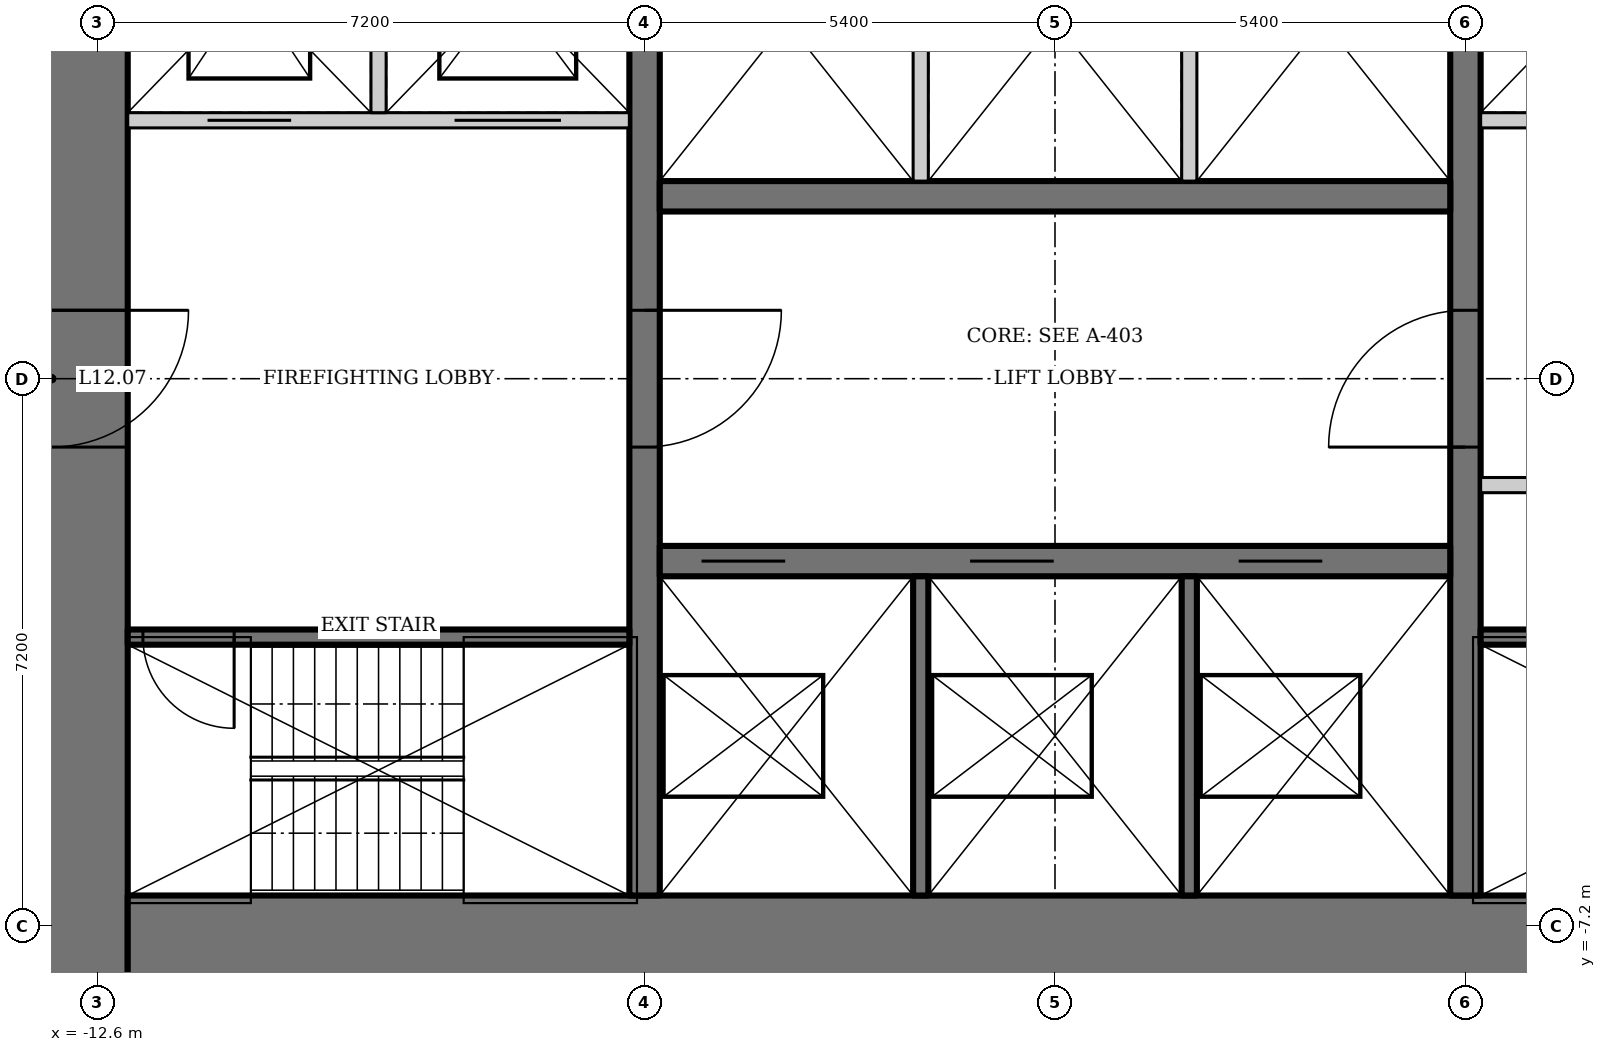
"""IFC4 building model, lengths in metres.
Left out: names, types, materials, properties, quantities, classifications, styles, units other than length and angle.
Written with IfcOpenShell. Run it as: python <this file> out.ifc"""

import sys

from ifc_helpers import new_model, si_unit, direction, frame, frame_2d, origin, place, context, subcontext, project, spatial, rectangle, extrude, element, fill, save


model = new_model("IFC4")
c1 = context("Model", 3, precision=1e-05, world=origin(), true_north=direction((0.0, 1.0)))
c2 = subcontext(c1, "Body", "Model", "MODEL_VIEW")
j1 = project(units=[si_unit("LENGTHUNIT", "METRE"), si_unit("PLANEANGLEUNIT", "RADIAN")], contexts=[c1])
p1 = place(None, origin())
s1 = spatial("IfcSite", under=j1, at=p1, CompositionType="ELEMENT")
p2 = place(p1, origin())
s2 = spatial("IfcBuilding", under=s1, at=p2, CompositionType="ELEMENT")
p3 = place(p2, frame((0.0, 0.0, 58.6)))
s3 = spatial("IfcBuildingStorey", under=s2, at=p3, CompositionType="ELEMENT", Elevation=58.6)
p4 = place(p3, frame((-13.2, 13.0, 0.0), z_axis=(0.0, 0.0, 1.0), x_axis=(0.0, -1.0, 0.0)))
e1 = element("IfcWall", 1, at=p4, inside=s3, PredefinedType="SHEAR", context=c2, shape_type="SweptSolid", body=[
    extrude(rectangle(XDim=26.0, YDim=2.0, at=frame_2d((13.0, 0.0))), origin(), (0.0, 0.0, 1.0), 3.6),
])
p5 = place(p4, frame((12.1, 0.0, 0.0)))
e2 = element("IfcOpeningElement", 2, at=p5, cuts=e1, PredefinedType="OPENING", context=c2, shape_type="SweptSolid", body=[
    extrude(rectangle(XDim=1.8, YDim=2.1, at=frame_2d((0.9, 1.05))), frame((0.0, 1.01, 0.0), z_axis=(0.0, -1.0, 0.0), x_axis=(1.0, 0.0, 0.0)), (0.0, 0.0, 1.0), 2.02),
])
p6 = place(p3, frame((-12.2, -8.0, 0.0), z_axis=(0.0, 0.0, 1.0), x_axis=(1.0, 0.0, 0.0)))
e3 = element("IfcWall", 3, at=p6, inside=s3, PredefinedType="SHEAR", context=c2, shape_type="SweptSolid", body=[
    extrude(rectangle(XDim=24.4, YDim=2.4, at=frame_2d((12.2, 0.0))), origin(), (0.0, 0.0, 1.0), 3.6),
])
p7 = place(p3, frame((5.4, -6.8, 0.0), z_axis=(0.0, 0.0, 1.0), x_axis=(0.0, 1.0, 0.0)))
e4 = element("IfcWall", 4, at=p7, inside=s3, PredefinedType="SHEAR", context=c2, shape_type="SweptSolid", body=[
    extrude(rectangle(XDim=13.6, YDim=0.4, at=frame_2d((6.8, 0.0))), origin(), (0.0, 0.0, 1.0), 3.6),
])
p8 = place(p7, frame((5.9, 0.0, 0.0)))
e5 = element("IfcOpeningElement", 5, at=p8, cuts=e4, PredefinedType="OPENING", context=c2, shape_type="SweptSolid", body=[
    extrude(rectangle(XDim=1.8, YDim=2.1, at=frame_2d((0.9, 1.05))), frame((0.0, 0.21, 0.0), z_axis=(0.0, -1.0, 0.0), x_axis=(1.0, 0.0, 0.0)), (0.0, 0.0, 1.0), 0.42),
])
p9 = place(p3, frame((-5.4, 6.8, 0.0), z_axis=(0.0, 0.0, 1.0), x_axis=(0.0, -1.0, 0.0)))
e6 = element("IfcWall", 6, at=p9, inside=s3, PredefinedType="SHEAR", context=c2, shape_type="SweptSolid", body=[
    extrude(rectangle(XDim=13.6, YDim=0.4, at=frame_2d((6.8, 0.0))), origin(), (0.0, 0.0, 1.0), 3.6),
])
p10 = place(p9, frame((5.9, 0.0, 0.0)))
e7 = element("IfcOpeningElement", 7, at=p10, cuts=e6, PredefinedType="OPENING", context=c2, shape_type="SweptSolid", body=[
    extrude(rectangle(XDim=1.8, YDim=2.1, at=frame_2d((0.9, 1.05))), frame((0.0, 0.21, 0.0), z_axis=(0.0, -1.0, 0.0), x_axis=(1.0, 0.0, 0.0)), (0.0, 0.0, 1.0), 0.42),
])
p11 = place(p3, frame((-5.2, -2.4, 0.0), z_axis=(0.0, 0.0, 1.0), x_axis=(1.0, 0.0, 0.0)))
e8 = element("IfcWall", 8, at=p11, inside=s3, PredefinedType="SHEAR", context=c2, shape_type="SweptSolid", body=[
    extrude(rectangle(XDim=10.4, YDim=0.4, at=frame_2d((5.2, 0.0))), origin(), (0.0, 0.0, 1.0), 3.6),
])
p12 = place(p11, frame((0.55, 0.0, 0.0)))
e9 = element("IfcOpeningElement", 9, at=p12, cuts=e8, PredefinedType="OPENING", context=c2, shape_type="SweptSolid", body=[
    extrude(rectangle(XDim=1.1, YDim=2.2, at=frame_2d((0.55, 1.1))), frame((0.0, 0.21, 0.0), z_axis=(0.0, -1.0, 0.0), x_axis=(1.0, 0.0, 0.0)), (0.0, 0.0, 1.0), 0.42),
])
p13 = place(p11, frame((4.083, 0.0, 0.0)))
e10 = element("IfcOpeningElement", 10, at=p13, cuts=e8, PredefinedType="OPENING", context=c2, shape_type="SweptSolid", body=[
    extrude(rectangle(XDim=1.1, YDim=2.2, at=frame_2d((0.55, 1.1))), frame((0.0, 0.21, 0.0), z_axis=(0.0, -1.0, 0.0), x_axis=(1.0, 0.0, 0.0)), (0.0, 0.0, 1.0), 0.42),
])
p14 = place(p11, frame((7.617, 0.0, 0.0)))
e11 = element("IfcOpeningElement", 11, at=p14, cuts=e8, PredefinedType="OPENING", context=c2, shape_type="SweptSolid", body=[
    extrude(rectangle(XDim=1.1, YDim=2.2, at=frame_2d((0.55, 1.1))), frame((0.0, 0.21, 0.0), z_axis=(0.0, -1.0, 0.0), x_axis=(1.0, 0.0, 0.0)), (0.0, 0.0, 1.0), 0.42),
])
for number, where, z_axis, x_axis in (
    (12, (-1.767, -2.6, 0.0), (0.0, 0.0, 1.0), (0.0, -1.0, 0.0)),
    (13, (1.767, -2.6, 0.0), (0.0, 0.0, 1.0), (0.0, -1.0, 0.0)),
):
    element("IfcWall", number, at=place(p3, frame(where, z_axis=z_axis, x_axis=x_axis)), inside=s3, PredefinedType="SOLIDWALL", context=c2, shape_type="SweptSolid", body=[
        extrude(rectangle(XDim=4.2, YDim=0.2, at=frame_2d((2.1, 0.0))), origin(), (0.0, 0.0, 1.0), 3.6),
    ])
p15 = place(p3, frame((5.2, 2.4, 0.0), z_axis=(0.0, 0.0, 1.0), x_axis=(-1.0, 0.0, 0.0)))
e14 = element("IfcWall", 14, at=p15, inside=s3, PredefinedType="SHEAR", context=c2, shape_type="SweptSolid", body=[
    extrude(rectangle(XDim=10.4, YDim=0.4, at=frame_2d((5.2, 0.0))), origin(), (0.0, 0.0, 1.0), 3.6),
])
for number, where, z_axis, x_axis in (
    (15, (-1.767, 2.6, 0.0), (0.0, 0.0, 1.0), (0.0, 1.0, 0.0)),
    (16, (1.767, 2.6, 0.0), (0.0, 0.0, 1.0), (0.0, 1.0, 0.0)),
):
    element("IfcWall", number, at=place(p3, frame(where, z_axis=z_axis, x_axis=x_axis)), inside=s3, PredefinedType="SOLIDWALL", context=c2, shape_type="SweptSolid", body=[
        extrude(rectangle(XDim=4.2, YDim=0.2, at=frame_2d((2.1, 0.0))), origin(), (0.0, 0.0, 1.0), 3.6),
    ])
p16 = place(p3, frame((5.6, -3.4, 0.0), z_axis=(0.0, 0.0, 1.0), x_axis=(1.0, 0.0, 0.0)))
e17 = element("IfcWall", 17, at=p16, inside=s3, PredefinedType="SHEAR", context=c2, shape_type="SweptSolid", body=[
    extrude(rectangle(XDim=6.6, YDim=0.2, at=frame_2d((3.3, 0.0))), origin(), (0.0, 0.0, 1.0), 3.6),
])
p17 = place(p16, frame((5.2, 0.0, 0.0)))
e18 = element("IfcOpeningElement", 18, at=p17, cuts=e17, PredefinedType="OPENING", context=c2, shape_type="SweptSolid", body=[
    extrude(rectangle(XDim=1.2, YDim=2.1, at=frame_2d((0.6, 1.05))), frame((0.0, 0.11, 0.0), z_axis=(0.0, -1.0, 0.0), x_axis=(1.0, 0.0, 0.0)), (0.0, 0.0, 1.0), 0.22),
])
p18 = place(p3, frame((12.2, 3.4, 0.0), z_axis=(0.0, 0.0, 1.0), x_axis=(-1.0, 0.0, 0.0)))
e19 = element("IfcWall", 19, at=p18, inside=s3, PredefinedType="SOLIDWALL", context=c2, shape_type="SweptSolid", body=[
    extrude(rectangle(XDim=6.6, YDim=0.2, at=frame_2d((3.3, 0.0))), origin(), (0.0, 0.0, 1.0), 3.6),
])
p19 = place(p18, frame((4.45, 0.0, 0.0)))
e20 = element("IfcOpeningElement", 20, at=p19, cuts=e19, PredefinedType="OPENING", context=c2, shape_type="SweptSolid", body=[
    extrude(rectangle(XDim=1.1, YDim=2.2, at=frame_2d((0.55, 1.1))), frame((0.0, 0.11, 0.0), z_axis=(0.0, -1.0, 0.0), x_axis=(1.0, 0.0, 0.0)), (0.0, 0.0, 1.0), 0.22),
])
p20 = place(p18, frame((0.9, 0.0, 0.0)))
e21 = element("IfcOpeningElement", 21, at=p20, cuts=e19, PredefinedType="OPENING", context=c2, shape_type="SweptSolid", body=[
    extrude(rectangle(XDim=1.4, YDim=2.2, at=frame_2d((0.7, 1.1))), frame((0.0, 0.11, 0.0), z_axis=(0.0, -1.0, 0.0), x_axis=(1.0, 0.0, 0.0)), (0.0, 0.0, 1.0), 0.22),
])
p21 = place(p3, frame((-5.6, -3.4, 0.0), z_axis=(0.0, 0.0, 1.0), x_axis=(-1.0, 0.0, 0.0)))
e22 = element("IfcWall", 22, at=p21, inside=s3, PredefinedType="SHEAR", context=c2, shape_type="SweptSolid", body=[
    extrude(rectangle(XDim=6.6, YDim=0.2, at=frame_2d((3.3, 0.0))), origin(), (0.0, 0.0, 1.0), 3.6),
])
p22 = place(p21, frame((5.2, 0.0, 0.0)))
e23 = element("IfcOpeningElement", 23, at=p22, cuts=e22, PredefinedType="OPENING", context=c2, shape_type="SweptSolid", body=[
    extrude(rectangle(XDim=1.2, YDim=2.1, at=frame_2d((0.6, 1.05))), frame((0.0, 0.11, 0.0), z_axis=(0.0, -1.0, 0.0), x_axis=(1.0, 0.0, 0.0)), (0.0, 0.0, 1.0), 0.22),
])
p23 = place(p3, frame((-12.2, 3.4, 0.0), z_axis=(0.0, 0.0, 1.0), x_axis=(1.0, 0.0, 0.0)))
e24 = element("IfcWall", 24, at=p23, inside=s3, PredefinedType="SOLIDWALL", context=c2, shape_type="SweptSolid", body=[
    extrude(rectangle(XDim=6.6, YDim=0.2, at=frame_2d((3.3, 0.0))), origin(), (0.0, 0.0, 1.0), 3.6),
])
p24 = place(p23, frame((1.05, 0.0, 0.0)))
e25 = element("IfcOpeningElement", 25, at=p24, cuts=e24, PredefinedType="OPENING", context=c2, shape_type="SweptSolid", body=[
    extrude(rectangle(XDim=1.1, YDim=2.2, at=frame_2d((0.55, 1.1))), frame((0.0, 0.11, 0.0), z_axis=(0.0, -1.0, 0.0), x_axis=(1.0, 0.0, 0.0)), (0.0, 0.0, 1.0), 0.22),
])
p25 = place(p23, frame((4.3, 0.0, 0.0)))
e26 = element("IfcOpeningElement", 26, at=p25, cuts=e24, PredefinedType="OPENING", context=c2, shape_type="SweptSolid", body=[
    extrude(rectangle(XDim=1.4, YDim=2.2, at=frame_2d((0.7, 1.1))), frame((0.0, 0.11, 0.0), z_axis=(0.0, -1.0, 0.0), x_axis=(1.0, 0.0, 0.0)), (0.0, 0.0, 1.0), 0.22),
])
p26 = place(p3, frame((-8.9, 3.5, 0.0), z_axis=(0.0, 0.0, 1.0), x_axis=(0.0, 1.0, 0.0)))
e27 = element("IfcWall", 27, at=p26, inside=s3, PredefinedType="SOLIDWALL", context=c2, shape_type="SweptSolid", body=[
    extrude(rectangle(XDim=3.3, YDim=0.2, at=frame_2d((1.65, 0.0))), origin(), (0.0, 0.0, 1.0), 3.6),
])
p27 = place(p3, frame((5.6, -1.4, 0.0), z_axis=(0.0, 0.0, 1.0), x_axis=(1.0, 0.0, 0.0)))
e28 = element("IfcWall", 28, at=p27, inside=s3, PredefinedType="SOLIDWALL", context=c2, shape_type="SweptSolid", body=[
    extrude(rectangle(XDim=3.0, YDim=0.2, at=frame_2d((1.5, 0.0))), origin(), (0.0, 0.0, 1.0), 3.45),
])
p28 = place(p27, frame((1.05, 0.0, 0.0)))
e29 = element("IfcOpeningElement", 29, at=p28, cuts=e28, PredefinedType="OPENING", context=c2, shape_type="SweptSolid", body=[
    extrude(rectangle(XDim=0.9, YDim=2.1, at=frame_2d((0.45, 1.05))), frame((0.0, 0.11, 0.0), z_axis=(0.0, -1.0, 0.0), x_axis=(1.0, 0.0, 0.0)), (0.0, 0.0, 1.0), 0.22),
])
p29 = place(p8, origin())
e30 = element("IfcDoor", 30, at=p29, inside=s3, OperationType="DOUBLE_DOOR_DOUBLE_SWING", PredefinedType="DOOR", context=c2, shape_type="SweptSolid", body=[
    extrude(rectangle(XDim=1.8, YDim=2.1, at=frame_2d((0.9, 1.05))), frame((0.0, 0.025, 0.0), z_axis=(0.0, -1.0, 0.0), x_axis=(1.0, 0.0, 0.0)), (0.0, 0.0, 1.0), 0.05),
])
fill(e5, e30)
p30 = place(p10, origin())
e31 = element("IfcDoor", 31, at=p30, inside=s3, OperationType="DOUBLE_DOOR_DOUBLE_SWING", PredefinedType="DOOR", context=c2, shape_type="SweptSolid", body=[
    extrude(rectangle(XDim=1.8, YDim=2.1, at=frame_2d((0.9, 1.05))), frame((0.0, 0.025, 0.0), z_axis=(0.0, -1.0, 0.0), x_axis=(1.0, 0.0, 0.0)), (0.0, 0.0, 1.0), 0.05),
])
fill(e7, e31)
p31 = place(p22, origin())
e32 = element("IfcDoor", 32, at=p31, inside=s3, OperationType="SINGLE_SWING_RIGHT", PredefinedType="DOOR", context=c2, shape_type="SweptSolid", body=[
    extrude(rectangle(XDim=1.2, YDim=2.1, at=frame_2d((0.6, 1.05))), frame((0.0, 0.025, 0.0), z_axis=(0.0, -1.0, 0.0), x_axis=(1.0, 0.0, 0.0)), (0.0, 0.0, 1.0), 0.05),
])
fill(e23, e32)
p32 = place(p5, origin())
e33 = element("IfcDoor", 33, at=p32, inside=s3, OperationType="DOUBLE_DOOR_DOUBLE_SWING", PredefinedType="DOOR", context=c2, shape_type="SweptSolid", body=[
    extrude(rectangle(XDim=1.8, YDim=2.1, at=frame_2d((0.9, 1.05))), frame((0.0, 0.025, 0.0), z_axis=(0.0, -1.0, 0.0), x_axis=(1.0, 0.0, 0.0)), (0.0, 0.0, 1.0), 0.05),
])
fill(e2, e33)
p33 = place(p12, origin())
e34 = element("IfcDoor", 34, at=p33, inside=s3, OperationType="DOUBLE_DOOR_SLIDING", PredefinedType="DOOR", context=c2, shape_type="SweptSolid", body=[
    extrude(rectangle(XDim=1.1, YDim=2.2, at=frame_2d((0.55, 1.1))), frame((0.0, 0.025, 0.0), z_axis=(0.0, -1.0, 0.0), x_axis=(1.0, 0.0, 0.0)), (0.0, 0.0, 1.0), 0.05),
])
fill(e9, e34)
p34 = place(p13, origin())
e35 = element("IfcDoor", 35, at=p34, inside=s3, OperationType="DOUBLE_DOOR_SLIDING", PredefinedType="DOOR", context=c2, shape_type="SweptSolid", body=[
    extrude(rectangle(XDim=1.1, YDim=2.2, at=frame_2d((0.55, 1.1))), frame((0.0, 0.025, 0.0), z_axis=(0.0, -1.0, 0.0), x_axis=(1.0, 0.0, 0.0)), (0.0, 0.0, 1.0), 0.05),
])
fill(e10, e35)
p35 = place(p14, origin())
e36 = element("IfcDoor", 36, at=p35, inside=s3, OperationType="DOUBLE_DOOR_SLIDING", PredefinedType="DOOR", context=c2, shape_type="SweptSolid", body=[
    extrude(rectangle(XDim=1.1, YDim=2.2, at=frame_2d((0.55, 1.1))), frame((0.0, 0.025, 0.0), z_axis=(0.0, -1.0, 0.0), x_axis=(1.0, 0.0, 0.0)), (0.0, 0.0, 1.0), 0.05),
])
fill(e11, e36)
p36 = place(p24, origin())
e37 = element("IfcDoor", 37, at=p36, inside=s3, OperationType="DOUBLE_DOOR_SLIDING", PredefinedType="DOOR", context=c2, shape_type="SweptSolid", body=[
    extrude(rectangle(XDim=1.1, YDim=2.2, at=frame_2d((0.55, 1.1))), frame((0.0, 0.025, 0.0), z_axis=(0.0, -1.0, 0.0), x_axis=(1.0, 0.0, 0.0)), (0.0, 0.0, 1.0), 0.05),
])
fill(e25, e37)
p37 = place(p25, origin())
e38 = element("IfcDoor", 38, at=p37, inside=s3, OperationType="DOUBLE_DOOR_SLIDING", PredefinedType="DOOR", context=c2, shape_type="SweptSolid", body=[
    extrude(rectangle(XDim=1.4, YDim=2.2, at=frame_2d((0.7, 1.1))), frame((0.0, 0.025, 0.0), z_axis=(0.0, -1.0, 0.0), x_axis=(1.0, 0.0, 0.0)), (0.0, 0.0, 1.0), 0.05),
])
fill(e26, e38)
save(model, sys.argv[1])
